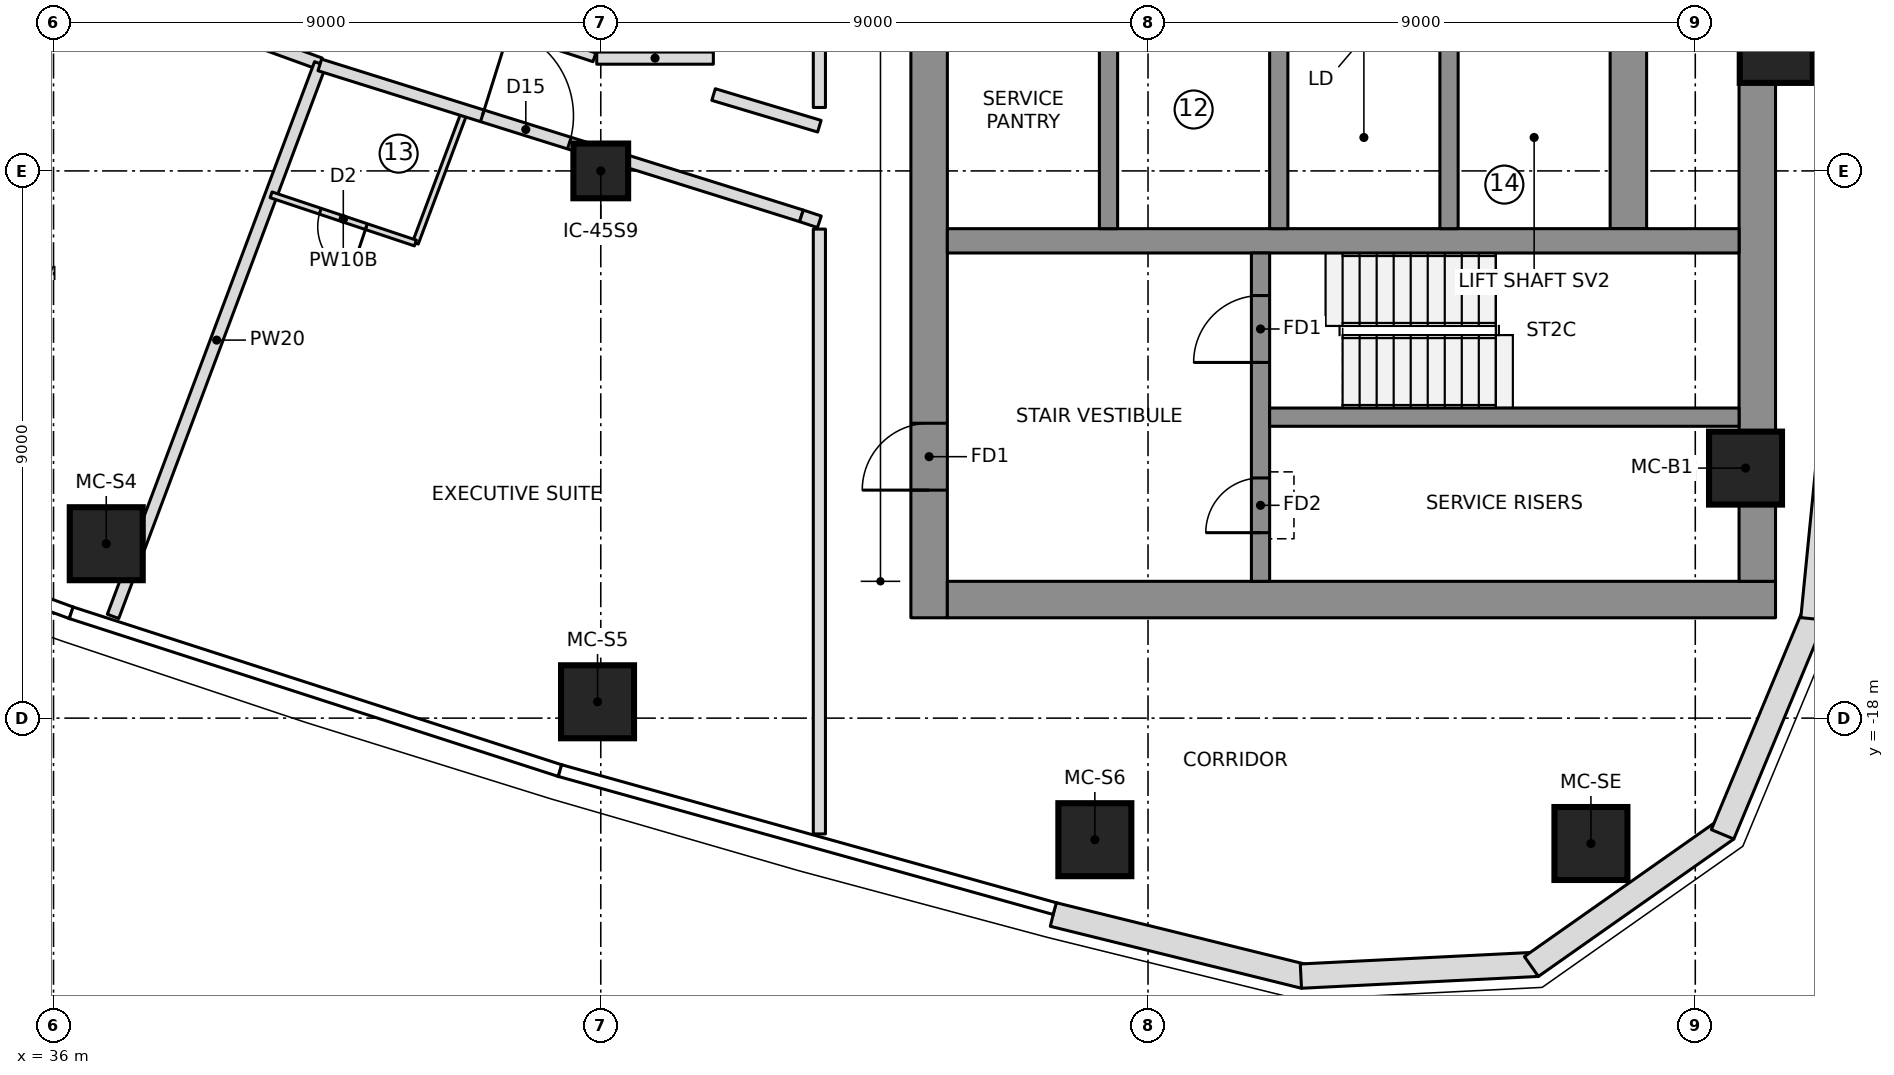
"""IFC4 building model, lengths in metres.
Left out: names, types, materials, properties, quantities, classifications, styles, units other than length and angle.
Written with IfcOpenShell. Run it as: python <this file> out.ifc"""

import sys

from ifc_helpers import new_model, si_unit, direction, frame, frame_2d, origin, origin_2d, place, context, subcontext, project, spatial, polyline, rectangle, outline, extrude, element, fill, save


model = new_model("IFC4")
c1 = context("Model", 3, precision=1e-05, world=origin(), true_north=direction((0.0, 1.0)))
c2 = subcontext(c1, "Body", "Model", "MODEL_VIEW")
j1 = project(units=[si_unit("LENGTHUNIT", "METRE"), si_unit("PLANEANGLEUNIT", "RADIAN")], contexts=[c1])
p1 = place(None, origin())
s1 = spatial("IfcSite", under=j1, at=p1, CompositionType="ELEMENT")
p2 = place(p1, origin())
s2 = spatial("IfcBuilding", under=s1, at=p2, CompositionType="ELEMENT")
p3 = place(p2, frame((0.0, 0.0, 242.1)))
s3 = spatial("IfcBuildingStorey", under=s2, at=p3, CompositionType="ELEMENT", Elevation=242.1)
p4 = place(p3, frame((50.4, -16.35, 0.0), z_axis=(0.0, 0.0, 1.0), x_axis=(0.0, 1.0, 0.0)))
e1 = element("IfcWall", 1, at=p4, inside=s3, PredefinedType="SHEAR", context=c2, shape_type="SweptSolid", body=[
    extrude(rectangle(XDim=9.7, YDim=0.6, at=frame_2d((4.85, 0.0))), origin(), (0.0, 0.0, 1.0), 3.55),
])
p5 = place(p4, frame((2.1, 0.0, 0.0)))
e2 = element("IfcOpeningElement", 2, at=p5, cuts=e1, PredefinedType="OPENING", context=c2, shape_type="SweptSolid", body=[
    extrude(rectangle(XDim=1.1, YDim=2.1, at=frame_2d((0.55, 1.05))), frame((0.0, 0.31, 0.0), z_axis=(0.0, -1.0, 0.0), x_axis=(1.0, 0.0, 0.0)), (0.0, 0.0, 1.0), 0.62),
])
p6 = place(p3, frame((50.7, -16.05, 0.0), z_axis=(0.0, 0.0, 1.0), x_axis=(1.0, 0.0, 0.0)))
e3 = element("IfcWall", 3, at=p6, inside=s3, PredefinedType="SHEAR", context=c2, shape_type="SweptSolid", body=[
    extrude(rectangle(XDim=13.62, YDim=0.6, at=frame_2d((6.81, 0.0))), origin(), (0.0, 0.0, 1.0), 3.55),
])
p7 = place(p3, frame((64.02, -15.75, 0.0), z_axis=(0.0, 0.0, 1.0), x_axis=(0.0, 1.0, 0.0)))
e4 = element("IfcWall", 4, at=p7, inside=s3, PredefinedType="SHEAR", context=c2, shape_type="SweptSolid", body=[
    extrude(rectangle(XDim=8.248, YDim=0.6, at=frame_2d((4.124, 0.0))), origin(), (0.0, 0.0, 1.0), 3.55),
])
p8 = place(p3, frame((61.9, -9.95, 0.0), z_axis=(0.0, 0.0, 1.0), x_axis=(0.0, 1.0, 0.0)))
e5 = element("IfcWall", 5, at=p8, inside=s3, PredefinedType="SHEAR", context=c2, shape_type="SweptSolid", body=[
    extrude(rectangle(XDim=19.9, YDim=0.6, at=frame_2d((9.95, 0.0))), origin(), (0.0, 0.0, 1.0), 3.55),
])
p9 = place(p3, frame((50.7, -10.15, 0.0), z_axis=(0.0, 0.0, 1.0), x_axis=(1.0, 0.0, 0.0)))
e6 = element("IfcWall", 6, at=p9, inside=s3, PredefinedType="SHEAR", context=c2, shape_type="SweptSolid", body=[
    extrude(rectangle(XDim=13.02, YDim=0.4, at=frame_2d((6.51, 0.0))), origin(), (0.0, 0.0, 1.0), 3.55),
])
for number, where, z_axis, x_axis in (
    (7, (53.35, -9.95, 0.0), (0.0, 0.0, 1.0), (0.0, 1.0, 0.0)),
    (8, (56.15, -9.95, 0.0), (0.0, 0.0, 1.0), (0.0, 1.0, 0.0)),
    (9, (58.95, -9.95, 0.0), (0.0, 0.0, 1.0), (0.0, 1.0, 0.0)),
):
    element("IfcWall", number, at=place(p3, frame(where, z_axis=z_axis, x_axis=x_axis)), inside=s3, PredefinedType="SHEAR", context=c2, shape_type="SweptSolid", body=[
        extrude(rectangle(XDim=3.0, YDim=0.3, at=frame_2d((1.5, 0.0))), origin(), (0.0, 0.0, 1.0), 3.55),
    ])
p10 = place(p3, frame((55.85, -15.75, 0.0), z_axis=(0.0, 0.0, 1.0), x_axis=(0.0, 1.0, 0.0)))
e10 = element("IfcWall", 10, at=p10, inside=s3, PredefinedType="SHEAR", context=c2, shape_type="SweptSolid", body=[
    extrude(rectangle(XDim=5.4, YDim=0.3, at=frame_2d((2.7, 0.0))), origin(), (0.0, 0.0, 1.0), 3.55),
])
p11 = place(p10, frame((3.6, 0.0, 0.0)))
e11 = element("IfcOpeningElement", 11, at=p11, cuts=e10, PredefinedType="OPENING", context=c2, shape_type="SweptSolid", body=[
    extrude(rectangle(XDim=1.1, YDim=2.1, at=frame_2d((0.55, 1.05))), frame((0.0, 0.16, 0.0), z_axis=(0.0, -1.0, 0.0), x_axis=(1.0, 0.0, 0.0)), (0.0, 0.0, 1.0), 0.32),
])
p12 = place(p10, frame((0.8, 0.0, 0.0)))
e12 = element("IfcOpeningElement", 12, at=p12, cuts=e10, PredefinedType="OPENING", context=c2, shape_type="SweptSolid", body=[
    extrude(rectangle(XDim=0.9, YDim=2.1, at=frame_2d((0.45, 1.05))), frame((0.0, 0.16, 0.0), z_axis=(0.0, -1.0, 0.0), x_axis=(1.0, 0.0, 0.0)), (0.0, 0.0, 1.0), 0.32),
])
p13 = place(p3, frame((56.0, -13.05, 0.0), z_axis=(0.0, 0.0, 1.0), x_axis=(1.0, 0.0, 0.0)))
e13 = element("IfcWall", 13, at=p13, inside=s3, PredefinedType="SHEAR", context=c2, shape_type="SweptSolid", body=[
    extrude(rectangle(XDim=7.72, YDim=0.3, at=frame_2d((3.86, 0.0))), origin(), (0.0, 0.0, 1.0), 3.55),
])
for number, where, z_axis, x_axis in (
    (14, (36.867, -15.132, 0.0), (0.0, 0.0, 1.0), (1.0, 0.0, 0.0)),
    (15, (44.947, -17.731, 0.0), (0.0, 0.0, 1.0), (1.0, 0.0, 0.0)),
    (16, (53.125, -20.0, 0.0), (0.0, 0.0, 1.0), (1.0, 0.0, 0.0)),
    (17, (61.284, -20.062, 0.0), (0.0, 0.0, 1.0), (1.0, 0.0, 0.0)),
    (18, (63.826, -13.888, 0.0), (0.0, 0.0, 1.0), (1.0, 0.0, 0.0)),
    (19, (64.332, -6.952, 0.0), (0.0, 0.0, 1.0), (1.0, 0.0, 0.0)),
):
    element("IfcColumn", number, at=place(p3, frame(where, z_axis=z_axis, x_axis=x_axis)), inside=s3, PredefinedType="COLUMN", context=c2, shape_type="SweptSolid", body=[
        extrude(rectangle(XDim=1.2, YDim=1.2, at=origin_2d()), origin(), (0.0, 0.0, 1.0), 3.55),
    ])
p14 = place(p3, frame((45.0, -9.0, 0.0), z_axis=(0.0, 0.0, 1.0), x_axis=(1.0, 0.0, 0.0)))
e20 = element("IfcColumn", 20, at=p14, inside=s3, PredefinedType="COLUMN", context=c2, shape_type="SweptSolid", body=[
    extrude(rectangle(XDim=0.9, YDim=0.9, at=origin_2d()), origin(), (0.0, 0.0, 1.0), 3.55),
])
p15 = place(p3, frame((52.441, -21.23, 0.0), z_axis=(0.0, 0.0, 1.0), x_axis=(0.970902342456, -0.23947576373, 0.0)))
e21 = element("IfcWall", 21, at=p15, inside=s3, PredefinedType="NOTDEFINED", context=c2, shape_type="SweptSolid", body=[
    extrude(outline(polyline([(0.0, -0.2), (4.255, -0.2), (4.197, 0.2), (0.0, 0.2), (0.0, -0.2)])), origin(), (0.0, 0.0, 1.0), 3.25),
])
p16 = place(p3, frame((56.543, -22.242, 0.0), z_axis=(0.0, 0.0, 1.0), x_axis=(0.998758875872, 0.049806705046, 0.0)))
e22 = element("IfcWall", 22, at=p16, inside=s3, PredefinedType="NOTDEFINED", context=c2, shape_type="SweptSolid", body=[
    extrude(outline(polyline([(-0.029, -0.2), (3.871, -0.2), (3.756, 0.2), (0.029, 0.2), (-0.029, -0.2)])), origin(), (0.0, 0.0, 1.0), 3.25),
])
p17 = place(p3, frame((60.352, -22.052, 0.0), z_axis=(0.0, 0.0, 1.0), x_axis=(0.817942545532, 0.575299915009, 0.0)))
e23 = element("IfcWall", 23, at=p17, inside=s3, PredefinedType="NOTDEFINED", context=c2, shape_type="SweptSolid", body=[
    extrude(outline(polyline([(-0.058, -0.2), (3.871, -0.2), (3.756, 0.2), (0.058, 0.2), (-0.058, -0.2)])), origin(), (0.0, 0.0, 1.0), 3.25),
])
p18 = place(p3, frame((63.471, -19.858, 0.0), z_axis=(0.0, 0.0, 1.0), x_axis=(0.3844335483, 0.923152667191, 0.0)))
e24 = element("IfcWall", 24, at=p18, inside=s3, PredefinedType="NOTDEFINED", context=c2, shape_type="SweptSolid", body=[
    extrude(outline(polyline([(-0.058, -0.2), (3.843, -0.2), (3.784, 0.2), (0.058, 0.2), (-0.058, -0.2)])), origin(), (0.0, 0.0, 1.0), 3.25),
])
p19 = place(p3, frame((64.938, -16.337, 0.0), z_axis=(0.0, 0.0, 1.0), x_axis=(0.098718218066, 0.995115427185, 0.0)))
e25 = element("IfcWall", 25, at=p19, inside=s3, PredefinedType="NOTDEFINED", context=c2, shape_type="SweptSolid", body=[
    extrude(outline(polyline([(-0.03, -0.2), (4.096, -0.2), (4.09, 0.2), (0.03, 0.2), (-0.03, -0.2)])), origin(), (0.0, 0.0, 1.0), 3.25),
])
p20 = place(p3, frame((31.738, -4.1, 0.0), z_axis=(0.0, 0.0, 1.0), x_axis=(0.940010170527, -0.341146419159, 0.0)))
e26 = element("IfcWall", 26, at=p20, inside=s3, PredefinedType="PARTITIONING", context=c2, shape_type="SweptSolid", body=[
    extrude(rectangle(XDim=9.2, YDim=0.2, at=frame_2d((4.6, 0.0))), origin(), (0.0, 0.0, 1.0), 3.25),
])
p21 = place(p20, frame((3.7, 0.0, 0.0)))
e27 = element("IfcOpeningElement", 27, at=p21, cuts=e26, PredefinedType="OPENING", context=c2, shape_type="SweptSolid", body=[
    extrude(rectangle(XDim=1.0, YDim=2.1, at=frame_2d((0.5, 1.05))), frame((0.0, 0.11, 0.0), z_axis=(0.0, -1.0, 0.0), x_axis=(1.0, 0.0, 0.0)), (0.0, 0.0, 1.0), 0.22),
])
p22 = place(p3, frame((36.979, -16.327, 0.0), z_axis=(0.0, 0.0, 1.0), x_axis=(0.351098633881, 0.936338480084, 0.0)))
e28 = element("IfcWall", 28, at=p22, inside=s3, PredefinedType="PARTITIONING", context=c2, shape_type="SweptSolid", body=[
    extrude(rectangle(XDim=9.707, YDim=0.2, at=frame_2d((4.853, 0.0))), origin(), (0.0, 0.0, 1.0), 3.25),
])
p23 = place(p3, frame((42.751, -8.052, 0.0), z_axis=(0.0, 0.0, 1.0), x_axis=(-0.351146927505, -0.936320370014, 0.0)))
e29 = element("IfcWall", 29, at=p23, inside=s3, PredefinedType="PARTITIONING", context=c2, shape_type="SweptSolid", body=[
    extrude(rectangle(XDim=2.278, YDim=0.1, at=frame_2d((1.139, 0.0))), origin(), (0.0, 0.0, 1.0), 3.25),
])
p24 = place(p3, frame((41.951, -10.186, 0.0), z_axis=(0.0, 0.0, 1.0), x_axis=(-0.948468383404, 0.316871781141, 0.0)))
e30 = element("IfcWall", 30, at=p24, inside=s3, PredefinedType="PARTITIONING", context=c2, shape_type="SweptSolid", body=[
    extrude(rectangle(XDim=2.502, YDim=0.1, at=frame_2d((1.251, 0.0))), origin(), (0.0, 0.0, 1.0), 3.25),
])
p25 = place(p24, frame((0.85, 0.0, 0.0)))
e31 = element("IfcOpeningElement", 31, at=p25, cuts=e30, PredefinedType="OPENING", context=c2, shape_type="SweptSolid", body=[
    extrude(rectangle(XDim=0.8, YDim=2.1, at=frame_2d((0.4, 1.05))), frame((0.0, 0.06, 0.0), z_axis=(0.0, -1.0, 0.0), x_axis=(1.0, 0.0, 0.0)), (0.0, 0.0, 1.0), 0.12),
])
p26 = place(p3, frame((40.38, -7.257, 0.0), z_axis=(0.0, 0.0, 1.0), x_axis=(0.954235234728, -0.299057046068, 0.0)))
e32 = element("IfcWall", 32, at=p26, inside=s3, PredefinedType="PARTITIONING", context=c2, shape_type="SweptSolid", body=[
    extrude(rectangle(XDim=8.3, YDim=0.2, at=frame_2d((4.15, 0.0))), origin(), (0.0, 0.0, 1.0), 3.25),
])
p27 = place(p26, frame((2.8, 0.0, 0.0)))
e33 = element("IfcOpeningElement", 33, at=p27, cuts=e32, PredefinedType="OPENING", context=c2, shape_type="SweptSolid", body=[
    extrude(rectangle(XDim=1.5, YDim=2.1, at=frame_2d((0.75, 1.05))), frame((0.0, 0.11, 0.0), z_axis=(0.0, -1.0, 0.0), x_axis=(1.0, 0.0, 0.0)), (0.0, 0.0, 1.0), 0.22),
])
p28 = place(p3, frame((48.595, 7.957, 0.0), z_axis=(0.0, 0.0, 1.0), x_axis=(0.0, -1.0, 0.0)))
e34 = element("IfcWall", 34, at=p28, inside=s3, PredefinedType="PARTITIONING", context=c2, shape_type="SweptSolid", body=[
    extrude(rectangle(XDim=15.914, YDim=0.2, at=frame_2d((7.957, 0.0))), origin(), (0.0, 0.0, 1.0), 3.25),
])
p29 = place(p28, frame((7.457, 0.0, 0.0)))
e35 = element("IfcOpeningElement", 35, at=p29, cuts=e34, PredefinedType="OPENING", context=c2, shape_type="SweptSolid", body=[
    extrude(rectangle(XDim=1.0, YDim=2.1, at=frame_2d((0.5, 1.05))), frame((0.0, 0.11, 0.0), z_axis=(0.0, -1.0, 0.0), x_axis=(1.0, 0.0, 0.0)), (0.0, 0.0, 1.0), 0.22),
])
p30 = place(p3, frame((48.595, -8.265, 0.0), z_axis=(0.0, 0.0, 1.0), x_axis=(-0.958014760688, 0.286718883759, 0.0)))
e36 = element("IfcWall", 36, at=p30, inside=s3, PredefinedType="PARTITIONING", context=c2, shape_type="SweptSolid", body=[
    extrude(rectangle(XDim=1.816, YDim=0.2, at=frame_2d((0.908, 0.0))), origin(), (0.0, 0.0, 1.0), 3.25),
])
p31 = place(p3, frame((46.852, -7.145, 0.0), z_axis=(0.0, 0.0, 1.0), x_axis=(-0.999999991898, 0.000127291241, 0.0)))
e37 = element("IfcWall", 37, at=p31, inside=s3, PredefinedType="PARTITIONING", context=c2, shape_type="SweptSolid", body=[
    extrude(rectangle(XDim=1.918, YDim=0.2, at=frame_2d((0.959, 0.0))), origin(), (0.0, 0.0, 1.0), 3.25),
])
p32 = place(p3, frame((44.896, -7.133, 0.0), z_axis=(0.0, 0.0, 1.0), x_axis=(-0.94991890936, 0.312496505006, 0.0)))
e38 = element("IfcWall", 38, at=p32, inside=s3, PredefinedType="PARTITIONING", context=c2, shape_type="SweptSolid", body=[
    extrude(rectangle(XDim=2.495, YDim=0.15, at=frame_2d((1.247, 0.0))), origin(), (0.0, 0.0, 1.0), 3.25),
])
p33 = place(p3, frame((48.3, -9.739, 0.0), z_axis=(0.0, 0.0, 1.0), x_axis=(0.949310105444, -0.314341094518, 0.0)))
e39 = element("IfcWall", 39, at=p33, inside=s3, PredefinedType="PARTITIONING", context=c2, shape_type="SweptSolid", body=[
    extrude(rectangle(XDim=0.311, YDim=0.2, at=frame_2d((0.155, 0.0))), origin(), (0.0, 0.0, 1.0), 3.25),
])
p34 = place(p3, frame((48.595, -9.957, 0.0), z_axis=(0.0, 0.0, 1.0), x_axis=(0.0, -1.0, 0.0)))
e40 = element("IfcWall", 40, at=p34, inside=s3, PredefinedType="PARTITIONING", context=c2, shape_type="SweptSolid", body=[
    extrude(rectangle(XDim=9.947, YDim=0.2, at=frame_2d((4.974, 0.0))), origin(), (0.0, 0.0, 1.0), 3.25),
])
p35 = place(p25, origin())
e41 = element("IfcDoor", 41, at=p35, inside=s3, OperationType="SINGLE_SWING_LEFT", PredefinedType="DOOR", context=c2, shape_type="SweptSolid", body=[
    extrude(rectangle(XDim=0.8, YDim=2.1, at=frame_2d((0.4, 1.05))), frame((0.0, 0.025, 0.0), z_axis=(0.0, -1.0, 0.0), x_axis=(1.0, 0.0, 0.0)), (0.0, 0.0, 1.0), 0.05),
])
fill(e31, e41)
p36 = place(p27, origin())
e42 = element("IfcDoor", 42, at=p36, inside=s3, OperationType="DOUBLE_DOOR_SINGLE_SWING", PredefinedType="DOOR", context=c2, shape_type="SweptSolid", body=[
    extrude(rectangle(XDim=1.5, YDim=2.1, at=frame_2d((0.75, 1.05))), frame((0.0, 0.025, 0.0), z_axis=(0.0, -1.0, 0.0), x_axis=(1.0, 0.0, 0.0)), (0.0, 0.0, 1.0), 0.05),
])
fill(e33, e42)
p37 = place(p11, origin())
e43 = element("IfcDoor", 43, at=p37, inside=s3, OperationType="SINGLE_SWING_RIGHT", PredefinedType="DOOR", context=c2, shape_type="SweptSolid", body=[
    extrude(rectangle(XDim=1.1, YDim=2.1, at=frame_2d((0.55, 1.05))), frame((0.0, 0.025, 0.0), z_axis=(0.0, -1.0, 0.0), x_axis=(1.0, 0.0, 0.0)), (0.0, 0.0, 1.0), 0.05),
])
fill(e11, e43)
p38 = place(p5, origin())
e44 = element("IfcDoor", 44, at=p38, inside=s3, OperationType="SINGLE_SWING_RIGHT", PredefinedType="DOOR", context=c2, shape_type="SweptSolid", body=[
    extrude(rectangle(XDim=1.1, YDim=2.1, at=frame_2d((0.55, 1.05))), frame((0.0, 0.025, 0.0), z_axis=(0.0, -1.0, 0.0), x_axis=(1.0, 0.0, 0.0)), (0.0, 0.0, 1.0), 0.05),
])
fill(e2, e44)
p39 = place(p12, origin())
e45 = element("IfcDoor", 45, at=p39, inside=s3, OperationType="SINGLE_SWING_LEFT", PredefinedType="DOOR", context=c2, shape_type="SweptSolid", body=[
    extrude(rectangle(XDim=0.9, YDim=2.1, at=frame_2d((0.45, 1.05))), frame((0.0, 0.025, 0.0), z_axis=(0.0, -1.0, 0.0), x_axis=(1.0, 0.0, 0.0)), (0.0, 0.0, 1.0), 0.05),
])
fill(e12, e45)
save(model, sys.argv[1])
